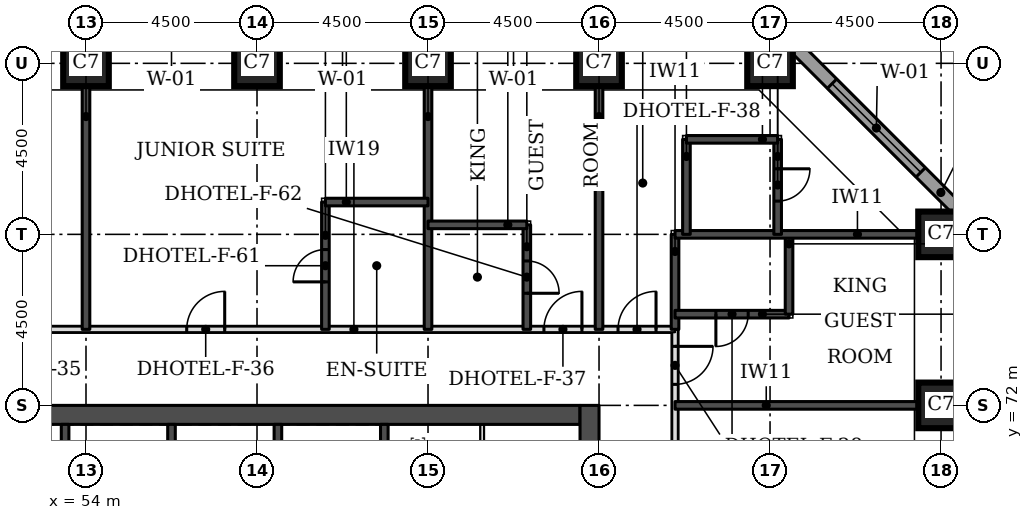
"""IFC4 building model, lengths in metres.
Left out: names, types, materials, properties, quantities, classifications, styles, units other than length and angle.
Written with IfcOpenShell. Run it as: python <this file> out.ifc"""

import sys

from ifc_helpers import new_model, si_unit, direction, frame, frame_2d, origin, origin_2d, place, context, subcontext, project, spatial, rectangle, extrude, element, fill, save


model = new_model("IFC4")
c1 = context("Model", 3, precision=1e-05, world=origin(), true_north=direction((0.0, 1.0)))
c2 = subcontext(c1, "Body", "Model", "MODEL_VIEW")
j1 = project(units=[si_unit("LENGTHUNIT", "METRE"), si_unit("PLANEANGLEUNIT", "RADIAN")], contexts=[c1])
p1 = place(None, origin())
s1 = spatial("IfcSite", under=j1, at=p1, CompositionType="ELEMENT")
p2 = place(p1, origin())
s2 = spatial("IfcBuilding", under=s1, at=p2, CompositionType="ELEMENT")
p3 = place(p2, frame((0.0, 0.0, 42.9)))
s3 = spatial("IfcBuildingStorey", under=s2, at=p3, CompositionType="ELEMENT", Elevation=42.9)
for number, where, z_axis, x_axis in (
    (1, (76.5, 72.0, 0.0), (0.0, 0.0, 1.0), (1.0, 0.0, 0.0)),
    (2, (76.5, 76.5, 0.0), (0.0, 0.0, 1.0), (1.0, 0.0, 0.0)),
    (3, (54.0, 81.0, 0.0), (0.0, 0.0, 1.0), (1.0, 0.0, 0.0)),
    (4, (58.5, 81.0, 0.0), (0.0, 0.0, 1.0), (1.0, 0.0, 0.0)),
    (5, (63.0, 81.0, 0.0), (0.0, 0.0, 1.0), (1.0, 0.0, 0.0)),
    (6, (67.5, 81.0, 0.0), (0.0, 0.0, 1.0), (1.0, 0.0, 0.0)),
    (7, (72.0, 81.0, 0.0), (0.0, 0.0, 1.0), (1.0, 0.0, 0.0)),
):
    element("IfcColumn", number, at=place(p3, frame(where, z_axis=z_axis, x_axis=x_axis)), inside=s3, PredefinedType="COLUMN", context=c2, shape_type="SweptSolid", body=[
        extrude(rectangle(XDim=1.2, YDim=1.2, at=origin_2d()), origin(), (0.0, 0.0, 1.0), 3.3),
    ])
p4 = place(p3, frame((45.5, 71.75, 0.0), z_axis=(0.0, 0.0, 1.0), x_axis=(1.0, 0.0, 0.0)))
e8 = element("IfcWall", 8, at=p4, inside=s3, PredefinedType="SHEAR", context=c2, shape_type="SweptSolid", body=[
    extrude(rectangle(XDim=21.5, YDim=0.5, at=frame_2d((10.75, 0.0))), origin(), (0.0, 0.0, 1.0), 3.3),
])
p5 = place(p3, frame((67.25, 49.5, 0.0), z_axis=(0.0, 0.0, 1.0), x_axis=(0.0, 1.0, 0.0)))
e9 = element("IfcWall", 9, at=p5, inside=s3, PredefinedType="SHEAR", context=c2, shape_type="SweptSolid", body=[
    extrude(rectangle(XDim=22.5, YDim=0.5, at=frame_2d((11.25, 0.0))), origin(), (0.0, 0.0, 1.0), 3.3),
])
p6 = place(p5, frame((4.2, 0.0, 0.0)))
e10 = element("IfcOpeningElement", 10, at=p6, cuts=e9, PredefinedType="OPENING", context=c2, shape_type="SweptSolid", body=[
    extrude(rectangle(XDim=1.8, YDim=2.1, at=frame_2d((0.9, 1.05))), frame((0.0, 0.26, 0.0), z_axis=(0.0, -1.0, 0.0), x_axis=(1.0, 0.0, 0.0)), (0.0, 0.0, 1.0), 0.52),
])
p7 = place(p5, frame((6.9, 0.0, 0.0)))
e11 = element("IfcOpeningElement", 11, at=p7, cuts=e9, PredefinedType="OPENING", context=c2, shape_type="SweptSolid", body=[
    extrude(rectangle(XDim=1.1, YDim=2.1, at=frame_2d((0.55, 1.05))), frame((0.0, 0.26, 0.0), z_axis=(0.0, -1.0, 0.0), x_axis=(1.0, 0.0, 0.0)), (0.0, 0.0, 1.0), 0.52),
])
p8 = place(p5, frame((13.6, 0.0, 0.0)))
e12 = element("IfcOpeningElement", 12, at=p8, cuts=e9, PredefinedType="OPENING", context=c2, shape_type="SweptSolid", body=[
    extrude(rectangle(XDim=1.1, YDim=2.1, at=frame_2d((0.55, 1.05))), frame((0.0, 0.26, 0.0), z_axis=(0.0, -1.0, 0.0), x_axis=(1.0, 0.0, 0.0)), (0.0, 0.0, 1.0), 0.52),
])
p9 = place(p5, frame((16.5, 0.0, 0.0)))
e13 = element("IfcOpeningElement", 13, at=p9, cuts=e9, PredefinedType="OPENING", context=c2, shape_type="SweptSolid", body=[
    extrude(rectangle(XDim=1.8, YDim=2.1, at=frame_2d((0.9, 1.05))), frame((0.0, 0.26, 0.0), z_axis=(0.0, -1.0, 0.0), x_axis=(1.0, 0.0, 0.0)), (0.0, 0.0, 1.0), 0.52),
])
p10 = place(p3, frame((77.326, 76.77, 0.0), z_axis=(0.0, 0.0, 1.0), x_axis=(-0.707106781187, 0.707106781187, 0.0)))
e14 = element("IfcWall", 14, at=p10, inside=s3, PredefinedType="STANDARD", context=c2, shape_type="SweptSolid", body=[
    extrude(rectangle(XDim=7.151, YDim=0.35, at=frame_2d((3.576, 0.0))), origin(), (0.0, 0.0, 1.0), 3.055),
])
p11 = place(p10, frame((1.926, 0.0, 0.8)))
e15 = element("IfcOpeningElement", 15, at=p11, cuts=e14, PredefinedType="OPENING", context=c2, shape_type="SweptSolid", body=[
    extrude(rectangle(XDim=3.3, YDim=1.5, at=frame_2d((1.65, 0.75))), frame((0.0, 0.185, 0.0), z_axis=(0.0, -1.0, 0.0), x_axis=(1.0, 0.0, 0.0)), (0.0, 0.0, 1.0), 0.37),
])
p12 = place(p3, frame((69.5, 47.5, 0.0), z_axis=(0.0, 0.0, 1.0), x_axis=(0.0, 1.0, 0.0)))
e16 = element("IfcWall", 16, at=p12, inside=s3, PredefinedType="PARTITIONING", context=c2, shape_type="SweptSolid", body=[
    extrude(rectangle(XDim=26.5, YDim=0.15, at=frame_2d((13.25, 0.0))), origin(), (0.0, 0.0, 1.0), 3.08),
])
p13 = place(p12, frame((25.053, 0.0, 0.0)))
e17 = element("IfcOpeningElement", 17, at=p13, cuts=e16, PredefinedType="OPENING", context=c2, shape_type="SweptSolid", body=[
    extrude(rectangle(XDim=1.0, YDim=2.1, at=frame_2d((0.5, 1.05))), frame((0.0, 0.085, 0.0), z_axis=(0.0, -1.0, 0.0), x_axis=(1.0, 0.0, 0.0)), (0.0, 0.0, 1.0), 0.17),
])
p14 = place(p12, frame((21.1, 0.0, 0.0)))
e18 = element("IfcOpeningElement", 18, at=p14, cuts=e16, PredefinedType="OPENING", context=c2, shape_type="SweptSolid", body=[
    extrude(rectangle(XDim=1.0, YDim=2.1, at=frame_2d((0.5, 1.05))), frame((0.0, 0.085, 0.0), z_axis=(0.0, -1.0, 0.0), x_axis=(1.0, 0.0, 0.0)), (0.0, 0.0, 1.0), 0.17),
])
p15 = place(p12, frame((8.75, 0.0, 0.0)))
e19 = element("IfcOpeningElement", 19, at=p15, cuts=e16, PredefinedType="OPENING", context=c2, shape_type="SweptSolid", body=[
    extrude(rectangle(XDim=1.1, YDim=2.1, at=frame_2d((0.55, 1.05))), frame((0.0, 0.085, 0.0), z_axis=(0.0, -1.0, 0.0), x_axis=(1.0, 0.0, 0.0)), (0.0, 0.0, 1.0), 0.17),
])
p16 = place(p12, frame((5.05, 0.0, 0.0)))
e20 = element("IfcOpeningElement", 20, at=p16, cuts=e16, PredefinedType="OPENING", context=c2, shape_type="SweptSolid", body=[
    extrude(rectangle(XDim=1.0, YDim=2.1, at=frame_2d((0.5, 1.05))), frame((0.0, 0.085, 0.0), z_axis=(0.0, -1.0, 0.0), x_axis=(1.0, 0.0, 0.0)), (0.0, 0.0, 1.0), 0.17),
])
p17 = place(p12, frame((0.447, 0.0, 0.0)))
e21 = element("IfcOpeningElement", 21, at=p17, cuts=e16, PredefinedType="OPENING", context=c2, shape_type="SweptSolid", body=[
    extrude(rectangle(XDim=1.0, YDim=2.1, at=frame_2d((0.5, 1.05))), frame((0.0, 0.085, 0.0), z_axis=(0.0, -1.0, 0.0), x_axis=(1.0, 0.0, 0.0)), (0.0, 0.0, 1.0), 0.17),
])
p18 = place(p3, frame((43.0, 74.0, 0.0), z_axis=(0.0, 0.0, 1.0), x_axis=(1.0, 0.0, 0.0)))
e22 = element("IfcWall", 22, at=p18, inside=s3, PredefinedType="PARTITIONING", context=c2, shape_type="SweptSolid", body=[
    extrude(rectangle(XDim=26.5, YDim=0.15, at=frame_2d((13.25, 0.0))), origin(), (0.0, 0.0, 1.0), 3.08),
])
p19 = place(p18, frame((7.6, 0.0, 0.0)))
e23 = element("IfcOpeningElement", 23, at=p19, cuts=e22, PredefinedType="OPENING", context=c2, shape_type="SweptSolid", body=[
    extrude(rectangle(XDim=1.0, YDim=2.1, at=frame_2d((0.5, 1.05))), frame((0.0, 0.085, 0.0), z_axis=(0.0, -1.0, 0.0), x_axis=(1.0, 0.0, 0.0)), (0.0, 0.0, 1.0), 0.17),
])
p20 = place(p18, frame((13.65, 0.0, 0.0)))
e24 = element("IfcOpeningElement", 24, at=p20, cuts=e22, PredefinedType="OPENING", context=c2, shape_type="SweptSolid", body=[
    extrude(rectangle(XDim=1.0, YDim=2.1, at=frame_2d((0.5, 1.05))), frame((0.0, 0.085, 0.0), z_axis=(0.0, -1.0, 0.0), x_axis=(1.0, 0.0, 0.0)), (0.0, 0.0, 1.0), 0.17),
])
p21 = place(p18, frame((23.05, 0.0, 0.0)))
e25 = element("IfcOpeningElement", 25, at=p21, cuts=e22, PredefinedType="OPENING", context=c2, shape_type="SweptSolid", body=[
    extrude(rectangle(XDim=1.0, YDim=2.1, at=frame_2d((0.5, 1.05))), frame((0.0, 0.085, 0.0), z_axis=(0.0, -1.0, 0.0), x_axis=(1.0, 0.0, 0.0)), (0.0, 0.0, 1.0), 0.17),
])
p22 = place(p18, frame((0.5, 0.0, 0.0)))
e26 = element("IfcOpeningElement", 26, at=p22, cuts=e22, PredefinedType="OPENING", context=c2, shape_type="SweptSolid", body=[
    extrude(rectangle(XDim=1.0, YDim=2.1, at=frame_2d((0.5, 1.05))), frame((0.0, 0.085, 0.0), z_axis=(0.0, -1.0, 0.0), x_axis=(1.0, 0.0, 0.0)), (0.0, 0.0, 1.0), 0.17),
])
p23 = place(p18, frame((25.0, 0.0, 0.0)))
e27 = element("IfcOpeningElement", 27, at=p23, cuts=e22, PredefinedType="OPENING", context=c2, shape_type="SweptSolid", body=[
    extrude(rectangle(XDim=1.0, YDim=2.1, at=frame_2d((0.5, 1.05))), frame((0.0, 0.085, 0.0), z_axis=(0.0, -1.0, 0.0), x_axis=(1.0, 0.0, 0.0)), (0.0, 0.0, 1.0), 0.17),
])
for number, where, z_axis, x_axis in (
    (28, (69.5, 72.0, 0.0), (0.0, 0.0, 1.0), (1.0, 0.0, 0.0)),
    (29, (54.0, 74.0, 0.0), (0.0, 0.0, 1.0), (0.0, 1.0, 0.0)),
):
    element("IfcWall", number, at=place(p3, frame(where, z_axis=z_axis, x_axis=x_axis)), inside=s3, PredefinedType="SOLIDWALL", context=c2, shape_type="SweptSolid", body=[
        extrude(rectangle(XDim=6.4, YDim=0.2, at=frame_2d((3.2, 0.0))), origin(), (0.0, 0.0, 1.0), 3.08),
    ])
p24 = place(p3, frame((60.3, 74.0, 0.0), z_axis=(0.0, 0.0, 1.0), x_axis=(0.0, 1.0, 0.0)))
e30 = element("IfcWall", 30, at=p24, inside=s3, PredefinedType="SOLIDWALL", context=c2, shape_type="SweptSolid", body=[
    extrude(rectangle(XDim=3.35, YDim=0.2, at=frame_2d((1.675, 0.0))), origin(), (0.0, 0.0, 1.0), 3.08),
])
p25 = place(p24, frame((1.25, 0.0, 0.0)))
e31 = element("IfcOpeningElement", 31, at=p25, cuts=e30, PredefinedType="OPENING", context=c2, shape_type="SweptSolid", body=[
    extrude(rectangle(XDim=0.85, YDim=2.1, at=frame_2d((0.425, 1.05))), frame((0.0, 0.11, 0.0), z_axis=(0.0, -1.0, 0.0), x_axis=(1.0, 0.0, 0.0)), (0.0, 0.0, 1.0), 0.22),
])
p26 = place(p3, frame((63.0, 74.0, 0.0), z_axis=(0.0, 0.0, 1.0), x_axis=(0.0, 1.0, 0.0)))
e32 = element("IfcWall", 32, at=p26, inside=s3, PredefinedType="SOLIDWALL", context=c2, shape_type="SweptSolid", body=[
    extrude(rectangle(XDim=6.4, YDim=0.2, at=frame_2d((3.2, 0.0))), origin(), (0.0, 0.0, 1.0), 3.08),
])
p27 = place(p3, frame((65.6, 74.0, 0.0), z_axis=(0.0, 0.0, 1.0), x_axis=(0.0, 1.0, 0.0)))
e33 = element("IfcWall", 33, at=p27, inside=s3, PredefinedType="SOLIDWALL", context=c2, shape_type="SweptSolid", body=[
    extrude(rectangle(XDim=2.75, YDim=0.2, at=frame_2d((1.375, 0.0))), origin(), (0.0, 0.0, 1.0), 3.08),
])
p28 = place(p27, frame((0.95, 0.0, 0.0)))
e34 = element("IfcOpeningElement", 34, at=p28, cuts=e33, PredefinedType="OPENING", context=c2, shape_type="SweptSolid", body=[
    extrude(rectangle(XDim=0.85, YDim=2.1, at=frame_2d((0.425, 1.05))), frame((0.0, 0.11, 0.0), z_axis=(0.0, -1.0, 0.0), x_axis=(1.0, 0.0, 0.0)), (0.0, 0.0, 1.0), 0.22),
])
p29 = place(p3, frame((67.5, 74.0, 0.0), z_axis=(0.0, 0.0, 1.0), x_axis=(0.0, 1.0, 0.0)))
e35 = element("IfcWall", 35, at=p29, inside=s3, PredefinedType="SOLIDWALL", context=c2, shape_type="SweptSolid", body=[
    extrude(rectangle(XDim=6.4, YDim=0.2, at=frame_2d((3.2, 0.0))), origin(), (0.0, 0.0, 1.0), 3.08),
])
p30 = place(p3, frame((69.5, 74.0, 0.0), z_axis=(0.0, 0.0, 1.0), x_axis=(0.0, 1.0, 0.0)))
e36 = element("IfcWall", 36, at=p30, inside=s3, PredefinedType="SOLIDWALL", context=c2, shape_type="SweptSolid", body=[
    extrude(rectangle(XDim=2.5, YDim=0.2, at=frame_2d((1.25, 0.0))), origin(), (0.0, 0.0, 1.0), 3.08),
])
p31 = place(p3, frame((69.5, 74.4, 0.0), z_axis=(0.0, 0.0, 1.0), x_axis=(1.0, 0.0, 0.0)))
e37 = element("IfcWall", 37, at=p31, inside=s3, PredefinedType="SOLIDWALL", context=c2, shape_type="SweptSolid", body=[
    extrude(rectangle(XDim=3.0, YDim=0.2, at=frame_2d((1.5, 0.0))), origin(), (0.0, 0.0, 1.0), 3.08),
])
p32 = place(p31, frame((1.075, 0.0, 0.0)))
e38 = element("IfcOpeningElement", 38, at=p32, cuts=e37, PredefinedType="OPENING", context=c2, shape_type="SweptSolid", body=[
    extrude(rectangle(XDim=0.85, YDim=2.1, at=frame_2d((0.425, 1.05))), frame((0.0, 0.11, 0.0), z_axis=(0.0, -1.0, 0.0), x_axis=(1.0, 0.0, 0.0)), (0.0, 0.0, 1.0), 0.22),
])
p33 = place(p3, frame((72.5, 74.4, 0.0), z_axis=(0.0, 0.0, 1.0), x_axis=(0.0, 1.0, 0.0)))
e39 = element("IfcWall", 39, at=p33, inside=s3, PredefinedType="SOLIDWALL", context=c2, shape_type="SweptSolid", body=[
    extrude(rectangle(XDim=2.1, YDim=0.2, at=frame_2d((1.05, 0.0))), origin(), (0.0, 0.0, 1.0), 3.08),
])
p34 = place(p3, frame((69.5, 76.5, 0.0), z_axis=(0.0, 0.0, 1.0), x_axis=(1.0, 0.0, 0.0)))
e40 = element("IfcWall", 40, at=p34, inside=s3, PredefinedType="SOLIDWALL", context=c2, shape_type="SweptSolid", body=[
    extrude(rectangle(XDim=6.4, YDim=0.2, at=frame_2d((3.2, 0.0))), origin(), (0.0, 0.0, 1.0), 3.08),
])
p35 = place(p3, frame((69.8, 76.5, 0.0), z_axis=(0.0, 0.0, 1.0), x_axis=(0.0, 1.0, 0.0)))
e41 = element("IfcWall", 41, at=p35, inside=s3, PredefinedType="SOLIDWALL", context=c2, shape_type="SweptSolid", body=[
    extrude(rectangle(XDim=2.5, YDim=0.2, at=frame_2d((1.25, 0.0))), origin(), (0.0, 0.0, 1.0), 3.08),
])
p36 = place(p3, frame((72.2, 76.5, 0.0), z_axis=(0.0, 0.0, 1.0), x_axis=(0.0, 1.0, 0.0)))
e42 = element("IfcWall", 42, at=p36, inside=s3, PredefinedType="SOLIDWALL", context=c2, shape_type="SweptSolid", body=[
    extrude(rectangle(XDim=2.5, YDim=0.2, at=frame_2d((1.25, 0.0))), origin(), (0.0, 0.0, 1.0), 3.08),
])
p37 = place(p36, frame((0.875, 0.0, 0.0)))
e43 = element("IfcOpeningElement", 43, at=p37, cuts=e42, PredefinedType="OPENING", context=c2, shape_type="SweptSolid", body=[
    extrude(rectangle(XDim=0.85, YDim=2.1, at=frame_2d((0.425, 1.05))), frame((0.0, 0.11, 0.0), z_axis=(0.0, -1.0, 0.0), x_axis=(1.0, 0.0, 0.0)), (0.0, 0.0, 1.0), 0.22),
])
p38 = place(p3, frame((63.0, 76.75, 0.0), z_axis=(0.0, 0.0, 1.0), x_axis=(1.0, 0.0, 0.0)))
e44 = element("IfcWall", 44, at=p38, inside=s3, PredefinedType="SOLIDWALL", context=c2, shape_type="SweptSolid", body=[
    extrude(rectangle(XDim=2.6, YDim=0.2, at=frame_2d((1.3, 0.0))), origin(), (0.0, 0.0, 1.0), 3.08),
])
p39 = place(p3, frame((60.3, 77.35, 0.0), z_axis=(0.0, 0.0, 1.0), x_axis=(1.0, 0.0, 0.0)))
e45 = element("IfcWall", 45, at=p39, inside=s3, PredefinedType="SOLIDWALL", context=c2, shape_type="SweptSolid", body=[
    extrude(rectangle(XDim=2.7, YDim=0.2, at=frame_2d((1.35, 0.0))), origin(), (0.0, 0.0, 1.0), 3.08),
])
p40 = place(p3, frame((69.8, 79.0, 0.0), z_axis=(0.0, 0.0, 1.0), x_axis=(1.0, 0.0, 0.0)))
e46 = element("IfcWall", 46, at=p40, inside=s3, PredefinedType="SOLIDWALL", context=c2, shape_type="SweptSolid", body=[
    extrude(rectangle(XDim=2.4, YDim=0.2, at=frame_2d((1.2, 0.0))), origin(), (0.0, 0.0, 1.0), 3.08),
])
for number, where, z_axis, x_axis in (
    (47, (53.45, 68.5, 0.0), (0.0, 0.0, 1.0), (0.0, 1.0, 0.0)),
    (48, (56.25, 68.5, 0.0), (0.0, 0.0, 1.0), (0.0, 1.0, 0.0)),
    (49, (59.05, 68.5, 0.0), (0.0, 0.0, 1.0), (0.0, 1.0, 0.0)),
    (50, (61.85, 68.5, 0.0), (0.0, 0.0, 1.0), (0.0, 1.0, 0.0)),
):
    element("IfcWall", number, at=place(p3, frame(where, z_axis=z_axis, x_axis=x_axis)), inside=s3, PredefinedType="SOLIDWALL", context=c2, shape_type="SweptSolid", body=[
        extrude(rectangle(XDim=3.0, YDim=0.2, at=frame_2d((1.5, 0.0))), origin(), (0.0, 0.0, 1.0), 3.08),
    ])
p41 = place(p3, frame((64.425, 68.5, 0.0), z_axis=(0.0, 0.0, 1.0), x_axis=(0.0, 1.0, 0.0)))
e51 = element("IfcWall", 51, at=p41, inside=s3, PredefinedType="PARTITIONING", context=c2, shape_type="SweptSolid", body=[
    extrude(rectangle(XDim=3.0, YDim=0.1, at=frame_2d((1.5, 0.0))), origin(), (0.0, 0.0, 1.0), 3.08),
])
p42 = place(p11, origin())
e52 = element("IfcWindow", 52, at=p42, inside=s3, PartitioningType="SINGLE_PANEL", PredefinedType="WINDOW", context=c2, shape_type="SweptSolid", body=[
    extrude(rectangle(XDim=3.3, YDim=1.5, at=frame_2d((1.65, 0.75))), frame((0.0, 0.085, 0.0), z_axis=(0.0, -1.0, 0.0), x_axis=(1.0, 0.0, 0.0)), (0.0, 0.0, 1.0), 0.06),
])
fill(e15, e52)
p43 = place(p20, origin())
e53 = element("IfcDoor", 53, at=p43, inside=s3, OperationType="SINGLE_SWING_RIGHT", PredefinedType="DOOR", context=c2, shape_type="SweptSolid", body=[
    extrude(rectangle(XDim=1.0, YDim=2.1, at=frame_2d((0.5, 1.05))), frame((0.0, 0.025, 0.0), z_axis=(0.0, -1.0, 0.0), x_axis=(1.0, 0.0, 0.0)), (0.0, 0.0, 1.0), 0.05),
])
fill(e24, e53)
p44 = place(p25, origin())
e54 = element("IfcDoor", 54, at=p44, inside=s3, OperationType="SINGLE_SWING_LEFT", PredefinedType="DOOR", context=c2, shape_type="SweptSolid", body=[
    extrude(rectangle(XDim=0.85, YDim=2.1, at=frame_2d((0.425, 1.05))), frame((0.0, 0.025, 0.0), z_axis=(0.0, -1.0, 0.0), x_axis=(1.0, 0.0, 0.0)), (0.0, 0.0, 1.0), 0.05),
])
fill(e31, e54)
p45 = place(p21, origin())
e55 = element("IfcDoor", 55, at=p45, inside=s3, OperationType="SINGLE_SWING_RIGHT", PredefinedType="DOOR", context=c2, shape_type="SweptSolid", body=[
    extrude(rectangle(XDim=1.0, YDim=2.1, at=frame_2d((0.5, 1.05))), frame((0.0, 0.025, 0.0), z_axis=(0.0, -1.0, 0.0), x_axis=(1.0, 0.0, 0.0)), (0.0, 0.0, 1.0), 0.05),
])
fill(e25, e55)
p46 = place(p28, frame((0.85, 0.0, 0.0), z_axis=(0.0, 0.0, 1.0), x_axis=(-1.0, 0.0, 0.0)))
e56 = element("IfcDoor", 56, at=p46, inside=s3, OperationType="SINGLE_SWING_RIGHT", PredefinedType="DOOR", context=c2, shape_type="SweptSolid", body=[
    extrude(rectangle(XDim=0.85, YDim=2.1, at=frame_2d((0.425, 1.05))), frame((0.0, 0.025, 0.0), z_axis=(0.0, -1.0, 0.0), x_axis=(1.0, 0.0, 0.0)), (0.0, 0.0, 1.0), 0.05),
])
fill(e34, e56)
p47 = place(p13, frame((1.0, 0.0, 0.0), z_axis=(0.0, 0.0, 1.0), x_axis=(-1.0, 0.0, 0.0)))
e57 = element("IfcDoor", 57, at=p47, inside=s3, OperationType="SINGLE_SWING_LEFT", PredefinedType="DOOR", context=c2, shape_type="SweptSolid", body=[
    extrude(rectangle(XDim=1.0, YDim=2.1, at=frame_2d((0.5, 1.05))), frame((0.0, 0.025, 0.0), z_axis=(0.0, -1.0, 0.0), x_axis=(1.0, 0.0, 0.0)), (0.0, 0.0, 1.0), 0.05),
])
fill(e17, e57)
p48 = place(p32, frame((0.85, 0.0, 0.0), z_axis=(0.0, 0.0, 1.0), x_axis=(-1.0, 0.0, 0.0)))
e58 = element("IfcDoor", 58, at=p48, inside=s3, OperationType="SINGLE_SWING_RIGHT", PredefinedType="DOOR", context=c2, shape_type="SweptSolid", body=[
    extrude(rectangle(XDim=0.85, YDim=2.1, at=frame_2d((0.425, 1.05))), frame((0.0, 0.025, 0.0), z_axis=(0.0, -1.0, 0.0), x_axis=(1.0, 0.0, 0.0)), (0.0, 0.0, 1.0), 0.05),
])
fill(e38, e58)
p49 = place(p23, origin())
e59 = element("IfcDoor", 59, at=p49, inside=s3, OperationType="SINGLE_SWING_RIGHT", PredefinedType="DOOR", context=c2, shape_type="SweptSolid", body=[
    extrude(rectangle(XDim=1.0, YDim=2.1, at=frame_2d((0.5, 1.05))), frame((0.0, 0.025, 0.0), z_axis=(0.0, -1.0, 0.0), x_axis=(1.0, 0.0, 0.0)), (0.0, 0.0, 1.0), 0.05),
])
fill(e27, e59)
p50 = place(p37, frame((0.85, 0.0, 0.0), z_axis=(0.0, 0.0, 1.0), x_axis=(-1.0, 0.0, 0.0)))
e60 = element("IfcDoor", 60, at=p50, inside=s3, OperationType="SINGLE_SWING_LEFT", PredefinedType="DOOR", context=c2, shape_type="SweptSolid", body=[
    extrude(rectangle(XDim=0.85, YDim=2.1, at=frame_2d((0.425, 1.05))), frame((0.0, 0.025, 0.0), z_axis=(0.0, -1.0, 0.0), x_axis=(1.0, 0.0, 0.0)), (0.0, 0.0, 1.0), 0.05),
])
fill(e43, e60)
save(model, sys.argv[1])
